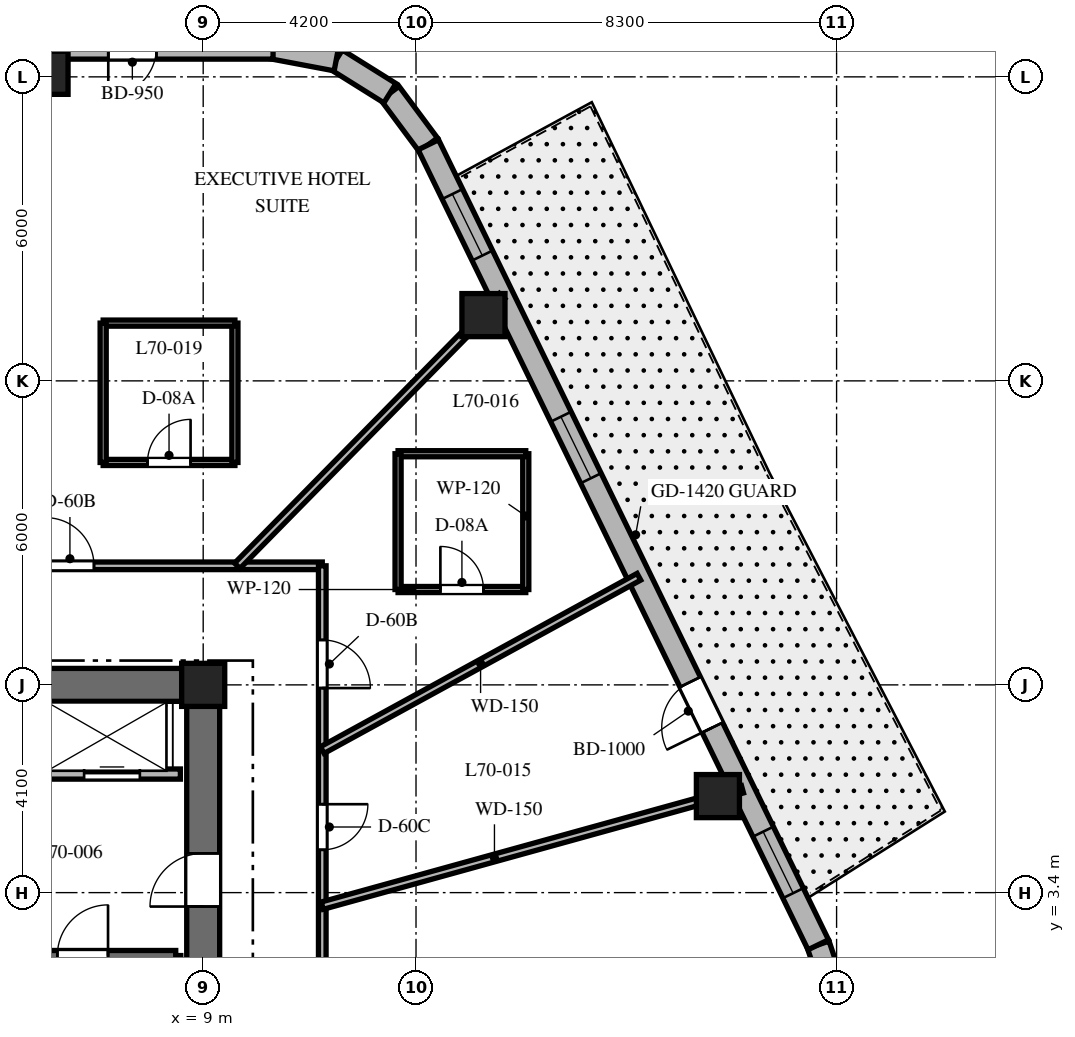
"""IFC4 building model, lengths in metres.
Left out: names, types, materials, properties, quantities, classifications, styles, units other than length and angle.
Written with IfcOpenShell. Run it as: python <this file> out.ifc"""

import sys

from ifc_helpers import new_model, si_unit, direction, frame, frame_2d, origin, origin_2d, place, context, subcontext, project, spatial, rectangle, extrude, element, fill, save


model = new_model("IFC4")
c1 = context("Model", 3, precision=1e-05, world=origin(), true_north=direction((0.0, 1.0)))
c2 = subcontext(c1, "Body", "Model", "MODEL_VIEW")
j1 = project(units=[si_unit("LENGTHUNIT", "METRE"), si_unit("PLANEANGLEUNIT", "RADIAN")], contexts=[c1])
p1 = place(None, origin())
s1 = spatial("IfcSite", under=j1, at=p1, CompositionType="ELEMENT")
p2 = place(p1, origin())
s2 = spatial("IfcBuilding", under=s1, at=p2, CompositionType="ELEMENT")
p3 = place(p2, frame((0.0, 0.0, 280.8)))
s3 = spatial("IfcBuildingStorey", under=s2, at=p3, CompositionType="ELEMENT", Elevation=280.8)
p4 = place(p3, frame((1.85, 7.5, 0.0), z_axis=(0.0, 0.0, 1.0), x_axis=(1.0, 0.0, 0.0)))
e1 = element("IfcWall", 1, at=p4, inside=s3, PredefinedType="SHEAR", context=c2, shape_type="SweptSolid", body=[
    extrude(rectangle(XDim=7.475, YDim=0.65, at=frame_2d((3.737, 0.0))), origin(), (0.0, 0.0, 1.0), 3.9),
])
p5 = place(p3, frame((9.0, -7.175, 0.0), z_axis=(0.0, 0.0, 1.0), x_axis=(0.0, 1.0, 0.0)))
e2 = element("IfcWall", 2, at=p5, inside=s3, PredefinedType="SHEAR", context=c2, shape_type="SweptSolid", body=[
    extrude(rectangle(XDim=14.35, YDim=0.65, at=frame_2d((7.175, 0.0))), origin(), (0.0, 0.0, 1.0), 3.9),
])
p6 = place(p5, frame((10.3, 0.0, 0.0)))
e3 = element("IfcOpeningElement", 3, at=p6, cuts=e2, PredefinedType="OPENING", context=c2, shape_type="SweptSolid", body=[
    extrude(rectangle(XDim=1.05, YDim=2.15, at=frame_2d((0.525, 1.075))), frame((0.0, 0.335, 0.0), z_axis=(0.0, -1.0, 0.0), x_axis=(1.0, 0.0, 0.0)), (0.0, 0.0, 1.0), 0.67),
])
p7 = place(p3, frame((8.458, -6.985, 0.0), z_axis=(0.0, 0.0, 1.0), x_axis=(0.0, 1.0, 0.0)))
e4 = element("IfcWall", 4, at=p7, inside=s3, PredefinedType="SHEAR", context=c2, shape_type="SweptSolid", body=[
    extrude(rectangle(XDim=9.143, YDim=0.2, at=frame_2d((4.572, 0.0))), origin(), (0.0, 0.0, 1.0), 3.9),
])
p8 = place(p3, frame((4.772, 2.158, 0.0), z_axis=(0.0, 0.0, 1.0), x_axis=(1.0, 0.0, 0.0)))
e5 = element("IfcWall", 5, at=p8, inside=s3, PredefinedType="SHEAR", context=c2, shape_type="SweptSolid", body=[
    extrude(rectangle(XDim=3.686, YDim=0.2, at=frame_2d((1.843, 0.0))), origin(), (0.0, 0.0, 1.0), 3.9),
])
p9 = place(p8, frame((1.35, 0.0, 0.0)))
e6 = element("IfcOpeningElement", 6, at=p9, cuts=e5, PredefinedType="OPENING", context=c2, shape_type="SweptSolid", body=[
    extrude(rectangle(XDim=1.0, YDim=2.15, at=frame_2d((0.5, 1.075))), frame((0.0, 0.11, 0.0), z_axis=(0.0, -1.0, 0.0), x_axis=(1.0, 0.0, 0.0)), (0.0, 0.0, 1.0), 0.22),
])
for number, where, z_axis, x_axis in (
    (7, (9.0, 7.5, 0.0), (0.0, 0.0, 1.0), (1.0, 0.0, 0.0)),
    (8, (19.158, 5.305, 0.0), (0.0, 0.0, 1.0), (1.0, 0.0, 0.0)),
    (9, (14.531, 14.798, 0.0), (0.0, 0.0, 1.0), (1.0, 0.0, 0.0)),
    (10, (5.908, 19.58, 0.0), (0.0, 0.0, 1.0), (1.0, 0.0, 0.0)),
):
    element("IfcColumn", number, at=place(p3, frame(where, z_axis=z_axis, x_axis=x_axis)), inside=s3, PredefinedType="COLUMN", context=c2, shape_type="SweptSolid", body=[
        extrude(rectangle(XDim=0.85, YDim=0.85, at=origin_2d()), origin(), (0.0, 0.0, 1.0), 3.9),
    ])
p10 = place(p3, frame((21.422, 1.522, 0.0), z_axis=(0.0, 0.0, 1.0), x_axis=(-0.316964162323, 0.94843751497, 0.0)))
e11 = element("IfcWall", 11, at=p10, inside=s3, PredefinedType="SOLIDWALL", context=c2, shape_type="SweptSolid", body=[
    extrude(rectangle(XDim=0.895, YDim=0.45, at=frame_2d((0.448, 0.0))), origin(), (0.0, 0.0, 1.0), 3.6),
])
p11 = place(p3, frame((13.443, 18.16, 0.0), z_axis=(0.0, 0.0, 1.0), x_axis=(-0.597042425808, 0.802209661987, 0.0)))
e12 = element("IfcWall", 12, at=p11, inside=s3, PredefinedType="SOLIDWALL", context=c2, shape_type="SweptSolid", body=[
    extrude(rectangle(XDim=1.27, YDim=0.45, at=frame_2d((0.635, 0.0))), origin(), (0.0, 0.0, 1.0), 3.6),
])
p12 = place(p3, frame((12.685, 19.178, 0.0), z_axis=(0.0, 0.0, 1.0), x_axis=(-0.848031272749, 0.529946186362, 0.0)))
e13 = element("IfcWall", 13, at=p12, inside=s3, PredefinedType="SOLIDWALL", context=c2, shape_type="SweptSolid", body=[
    extrude(rectangle(XDim=1.248, YDim=0.45, at=frame_2d((0.624, 0.0))), origin(), (0.0, 0.0, 1.0), 3.6),
])
p13 = place(p3, frame((11.626, 19.84, 0.0), z_axis=(0.0, 0.0, 1.0), x_axis=(-0.982701956681, 0.185194126083, 0.0)))
e14 = element("IfcWall", 14, at=p13, inside=s3, PredefinedType="SOLIDWALL", context=c2, shape_type="SweptSolid", body=[
    extrude(rectangle(XDim=1.27, YDim=0.45, at=frame_2d((0.635, 0.0))), origin(), (0.0, 0.0, 1.0), 3.6),
])
p14 = place(p3, frame((21.138, 2.371, 0.0), z_axis=(0.0, 0.0, 1.0), x_axis=(-0.438128124058, 0.89891253574, 0.0)))
e15 = element("IfcWall", 15, at=p14, inside=s3, PredefinedType="SOLIDWALL", context=c2, shape_type="SweptSolid", body=[
    extrude(rectangle(XDim=17.565, YDim=0.45, at=frame_2d((8.782, 0.0))), origin(), (0.0, 0.0, 1.0), 3.6),
])
p15 = place(p14, frame((4.769, 0.0, 0.0)))
e16 = element("IfcOpeningElement", 16, at=p15, cuts=e15, PredefinedType="OPENING", context=c2, shape_type="SweptSolid", body=[
    extrude(rectangle(XDim=1.0, YDim=2.15, at=frame_2d((0.5, 1.075))), frame((0.0, 0.235, 0.0), z_axis=(0.0, -1.0, 0.0), x_axis=(1.0, 0.0, 0.0)), (0.0, 0.0, 1.0), 0.47),
])
p16 = place(p14, frame((10.243, 0.0, 0.8)))
e17 = element("IfcOpeningElement", 17, at=p16, cuts=e15, PredefinedType="OPENING", context=c2, shape_type="SweptSolid", body=[
    extrude(rectangle(XDim=1.35, YDim=1.75, at=frame_2d((0.675, 0.875))), frame((0.0, 0.235, 0.0), z_axis=(0.0, -1.0, 0.0), x_axis=(1.0, 0.0, 0.0)), (0.0, 0.0, 1.0), 0.47),
])
p17 = place(p14, frame((15.132, 0.0, 0.8)))
e18 = element("IfcOpeningElement", 18, at=p17, cuts=e15, PredefinedType="OPENING", context=c2, shape_type="SweptSolid", body=[
    extrude(rectangle(XDim=1.35, YDim=1.75, at=frame_2d((0.675, 0.875))), frame((0.0, 0.235, 0.0), z_axis=(0.0, -1.0, 0.0), x_axis=(1.0, 0.0, 0.0)), (0.0, 0.0, 1.0), 0.47),
])
p18 = place(p14, frame((1.133, 0.0, 0.8)))
e19 = element("IfcOpeningElement", 19, at=p18, cuts=e15, PredefinedType="OPENING", context=c2, shape_type="SweptSolid", body=[
    extrude(rectangle(XDim=1.35, YDim=1.75, at=frame_2d((0.675, 0.875))), frame((0.0, 0.235, 0.0), z_axis=(0.0, -1.0, 0.0), x_axis=(1.0, 0.0, 0.0)), (0.0, 0.0, 1.0), 0.47),
])
p19 = place(p3, frame((10.379, 20.075, 0.0), z_axis=(0.0, 0.0, 1.0), x_axis=(-1.0, 0.0, 0.0)))
e20 = element("IfcWall", 20, at=p19, inside=s3, PredefinedType="SOLIDWALL", context=c2, shape_type="SweptSolid", body=[
    extrude(rectangle(XDim=22.417, YDim=0.45, at=frame_2d((11.208, 0.0))), origin(), (0.0, 0.0, 1.0), 3.6),
])
p20 = place(p19, frame((2.302, 0.0, 0.0)))
e21 = element("IfcOpeningElement", 21, at=p20, cuts=e20, PredefinedType="OPENING", context=c2, shape_type="SweptSolid", body=[
    extrude(rectangle(XDim=0.95, YDim=2.15, at=frame_2d((0.475, 1.075))), frame((0.0, 0.235, 0.0), z_axis=(0.0, -1.0, 0.0), x_axis=(1.0, 0.0, 0.0)), (0.0, 0.0, 1.0), 0.47),
])
p21 = place(p19, frame((7.82, 0.0, 0.8)))
e22 = element("IfcOpeningElement", 22, at=p21, cuts=e20, PredefinedType="OPENING", context=c2, shape_type="SweptSolid", body=[
    extrude(rectangle(XDim=1.35, YDim=1.75, at=frame_2d((0.675, 0.875))), frame((0.0, 0.235, 0.0), z_axis=(0.0, -1.0, 0.0), x_axis=(1.0, 0.0, 0.0)), (0.0, 0.0, 1.0), 0.47),
])
p22 = place(p19, frame((13.978, 0.0, 0.8)))
e23 = element("IfcOpeningElement", 23, at=p22, cuts=e20, PredefinedType="OPENING", context=c2, shape_type="SweptSolid", body=[
    extrude(rectangle(XDim=1.35, YDim=1.75, at=frame_2d((0.675, 0.875))), frame((0.0, 0.235, 0.0), z_axis=(0.0, -1.0, 0.0), x_axis=(1.0, 0.0, 0.0)), (0.0, 0.0, 1.0), 0.47),
])
p23 = place(p19, frame((19.587, 0.0, 0.8)))
e24 = element("IfcOpeningElement", 24, at=p23, cuts=e20, PredefinedType="OPENING", context=c2, shape_type="SweptSolid", body=[
    extrude(rectangle(XDim=1.35, YDim=1.75, at=frame_2d((0.675, 0.875))), frame((0.0, 0.235, 0.0), z_axis=(0.0, -1.0, 0.0), x_axis=(1.0, 0.0, 0.0)), (0.0, 0.0, 1.0), 0.47),
])
p24 = place(p3, frame((4.5, 5.74, 0.0), z_axis=(0.0, 0.0, 1.0), x_axis=(1.0, 0.0, 0.0)))
e25 = element("IfcWall", 25, at=p24, inside=s3, PredefinedType="PARTITIONING", context=c2, shape_type="SweptSolid", body=[
    extrude(rectangle(XDim=4.05, YDim=0.2, at=frame_2d((2.025, 0.0))), origin(), (0.0, 0.0, 1.0), 3.6),
])
p25 = place(p24, frame((0.3, 0.0, 0.0)))
e26 = element("IfcOpeningElement", 26, at=p25, cuts=e25, PredefinedType="OPENING", context=c2, shape_type="SweptSolid", body=[
    extrude(rectangle(XDim=0.85, YDim=2.03, at=frame_2d((0.425, 1.015))), frame((0.0, 0.11, 0.0), z_axis=(0.0, -1.0, 0.0), x_axis=(1.0, 0.0, 0.0)), (0.0, 0.0, 1.0), 0.22),
])
p26 = place(p24, frame((2.15, 0.0, 0.0)))
e27 = element("IfcOpeningElement", 27, at=p26, cuts=e25, PredefinedType="OPENING", context=c2, shape_type="SweptSolid", body=[
    extrude(rectangle(XDim=1.1, YDim=2.2, at=frame_2d((0.55, 1.1))), frame((0.0, 0.11, 0.0), z_axis=(0.0, -1.0, 0.0), x_axis=(1.0, 0.0, 0.0)), (0.0, 0.0, 1.0), 0.22),
])
p27 = place(p3, frame((0.92, 9.85, 0.0), z_axis=(0.0, 0.0, 1.0), x_axis=(1.0, 0.0, 0.0)))
e28 = element("IfcWall", 28, at=p27, inside=s3, PredefinedType="PARTITIONING", context=c2, shape_type="SweptSolid", body=[
    extrude(rectangle(XDim=10.43, YDim=0.15, at=frame_2d((5.215, 0.0))), origin(), (0.0, 0.0, 1.0), 3.09),
])
p28 = place(p27, frame((4.975, 0.0, 0.0)))
e29 = element("IfcOpeningElement", 29, at=p28, cuts=e28, PredefinedType="OPENING", context=c2, shape_type="SweptSolid", body=[
    extrude(rectangle(XDim=0.95, YDim=2.03, at=frame_2d((0.475, 1.015))), frame((0.0, 0.085, 0.0), z_axis=(0.0, -1.0, 0.0), x_axis=(1.0, 0.0, 0.0)), (0.0, 0.0, 1.0), 0.17),
])
p29 = place(p3, frame((11.35, 9.85, 0.0), z_axis=(0.0, 0.0, 1.0), x_axis=(0.0, -1.0, 0.0)))
e30 = element("IfcWall", 30, at=p29, inside=s3, PredefinedType="PARTITIONING", context=c2, shape_type="SweptSolid", body=[
    extrude(rectangle(XDim=12.4, YDim=0.15, at=frame_2d((6.2, 0.0))), origin(), (0.0, 0.0, 1.0), 3.09),
])
p30 = place(p29, frame((4.705, 0.0, 0.0)))
e31 = element("IfcOpeningElement", 31, at=p30, cuts=e30, PredefinedType="OPENING", context=c2, shape_type="SweptSolid", body=[
    extrude(rectangle(XDim=0.9, YDim=2.03, at=frame_2d((0.45, 1.015))), frame((0.0, 0.085, 0.0), z_axis=(0.0, -1.0, 0.0), x_axis=(1.0, 0.0, 0.0)), (0.0, 0.0, 1.0), 0.17),
])
p31 = place(p29, frame((1.463, 0.0, 0.0)))
e32 = element("IfcOpeningElement", 32, at=p31, cuts=e30, PredefinedType="OPENING", context=c2, shape_type="SweptSolid", body=[
    extrude(rectangle(XDim=0.95, YDim=2.03, at=frame_2d((0.475, 1.015))), frame((0.0, 0.085, 0.0), z_axis=(0.0, -1.0, 0.0), x_axis=(1.0, 0.0, 0.0)), (0.0, 0.0, 1.0), 0.17),
])
p32 = place(p29, frame((8.835, 0.0, 0.0)))
e33 = element("IfcOpeningElement", 33, at=p32, cuts=e30, PredefinedType="OPENING", context=c2, shape_type="SweptSolid", body=[
    extrude(rectangle(XDim=0.95, YDim=2.03, at=frame_2d((0.475, 1.015))), frame((0.0, 0.085, 0.0), z_axis=(0.0, -1.0, 0.0), x_axis=(1.0, 0.0, 0.0)), (0.0, 0.0, 1.0), 0.17),
])
p33 = place(p3, frame((11.35, 3.143, 0.0), z_axis=(0.0, 0.0, 1.0), x_axis=(0.963731818141, 0.266872596386, 0.0)))
e34 = element("IfcWall", 34, at=p33, inside=s3, PredefinedType="PARTITIONING", context=c2, shape_type="SweptSolid", body=[
    extrude(rectangle(XDim=8.605, YDim=0.15, at=frame_2d((4.302, 0.0))), origin(), (0.0, 0.0, 1.0), 2.94),
])
p34 = place(p3, frame((11.35, 6.213, 0.0), z_axis=(0.0, 0.0, 1.0), x_axis=(0.877157109774, 0.480203503499, 0.0)))
e35 = element("IfcWall", 35, at=p34, inside=s3, PredefinedType="PARTITIONING", context=c2, shape_type="SweptSolid", body=[
    extrude(rectangle(XDim=7.123, YDim=0.15, at=frame_2d((3.562, 0.0))), origin(), (0.0, 0.0, 1.0), 2.94),
])
p35 = place(p3, frame((9.672, 9.85, 0.0), z_axis=(0.0, 0.0, 1.0), x_axis=(0.700629771301, 0.713524998558, 0.0)))
e36 = element("IfcWall", 36, at=p35, inside=s3, PredefinedType="PARTITIONING", context=c2, shape_type="SweptSolid", body=[
    extrude(rectangle(XDim=7.459, YDim=0.15, at=frame_2d((3.73, 0.0))), origin(), (0.0, 0.0, 1.0), 2.94),
])
p36 = place(p3, frame((2.972, 9.85, 0.0), z_axis=(0.0, 0.0, 1.0), x_axis=(0.288872169679, 0.957367677324, 0.0)))
e37 = element("IfcWall", 37, at=p36, inside=s3, PredefinedType="PARTITIONING", context=c2, shape_type="SweptSolid", body=[
    extrude(rectangle(XDim=10.68, YDim=0.15, at=frame_2d((5.34, 0.0))), origin(), (0.0, 0.0, 1.0), 2.94),
])
p37 = place(p3, frame((12.846, 9.382, 0.0), z_axis=(0.0, 0.0, 1.0), x_axis=(1.0, 0.0, 0.0)))
e38 = element("IfcWall", 38, at=p37, inside=s3, PredefinedType="PARTITIONING", context=c2, shape_type="SweptSolid", body=[
    extrude(rectangle(XDim=2.52, YDim=0.12, at=frame_2d((1.26, 0.0))), origin(), (0.0, 0.0, 1.0), 3.126),
])
p38 = place(p37, frame((0.835, 0.0, 0.0)))
e39 = element("IfcOpeningElement", 39, at=p38, cuts=e38, PredefinedType="OPENING", context=c2, shape_type="SweptSolid", body=[
    extrude(rectangle(XDim=0.85, YDim=2.03, at=frame_2d((0.425, 1.015))), frame((0.0, 0.07, 0.0), z_axis=(0.0, -1.0, 0.0), x_axis=(1.0, 0.0, 0.0)), (0.0, 0.0, 1.0), 0.14),
])
p39 = place(p3, frame((15.366, 9.382, 0.0), z_axis=(0.0, 0.0, 1.0), x_axis=(0.0, 1.0, 0.0)))
e40 = element("IfcWall", 40, at=p39, inside=s3, PredefinedType="PARTITIONING", context=c2, shape_type="SweptSolid", body=[
    extrude(rectangle(XDim=2.68, YDim=0.12, at=frame_2d((1.34, 0.0))), origin(), (0.0, 0.0, 1.0), 3.6),
])
p40 = place(p3, frame((15.366, 12.062, 0.0), z_axis=(0.0, 0.0, 1.0), x_axis=(-1.0, 0.0, 0.0)))
e41 = element("IfcWall", 41, at=p40, inside=s3, PredefinedType="PARTITIONING", context=c2, shape_type="SweptSolid", body=[
    extrude(rectangle(XDim=2.52, YDim=0.12, at=frame_2d((1.26, 0.0))), origin(), (0.0, 0.0, 1.0), 3.126),
])
p41 = place(p3, frame((12.846, 12.062, 0.0), z_axis=(0.0, 0.0, 1.0), x_axis=(0.0, -1.0, 0.0)))
e42 = element("IfcWall", 42, at=p41, inside=s3, PredefinedType="PARTITIONING", context=c2, shape_type="SweptSolid", body=[
    extrude(rectangle(XDim=2.68, YDim=0.12, at=frame_2d((1.34, 0.0))), origin(), (0.0, 0.0, 1.0), 3.126),
])
p42 = place(p3, frame((7.026, 11.89, 0.0), z_axis=(0.0, 0.0, 1.0), x_axis=(1.0, 0.0, 0.0)))
e43 = element("IfcWall", 43, at=p42, inside=s3, PredefinedType="PARTITIONING", context=c2, shape_type="SweptSolid", body=[
    extrude(rectangle(XDim=2.6, YDim=0.12, at=frame_2d((1.3, 0.0))), origin(), (0.0, 0.0, 1.0), 3.041),
])
p43 = place(p42, frame((0.875, 0.0, 0.0)))
e44 = element("IfcOpeningElement", 44, at=p43, cuts=e43, PredefinedType="OPENING", context=c2, shape_type="SweptSolid", body=[
    extrude(rectangle(XDim=0.85, YDim=2.03, at=frame_2d((0.425, 1.015))), frame((0.0, 0.07, 0.0), z_axis=(0.0, -1.0, 0.0), x_axis=(1.0, 0.0, 0.0)), (0.0, 0.0, 1.0), 0.14),
])
p44 = place(p3, frame((9.626, 11.89, 0.0), z_axis=(0.0, 0.0, 1.0), x_axis=(0.0, 1.0, 0.0)))
e45 = element("IfcWall", 45, at=p44, inside=s3, PredefinedType="PARTITIONING", context=c2, shape_type="SweptSolid", body=[
    extrude(rectangle(XDim=2.75, YDim=0.12, at=frame_2d((1.375, 0.0))), origin(), (0.0, 0.0, 1.0), 3.172),
])
p45 = place(p3, frame((9.626, 14.64, 0.0), z_axis=(0.0, 0.0, 1.0), x_axis=(-1.0, 0.0, 0.0)))
e46 = element("IfcWall", 46, at=p45, inside=s3, PredefinedType="PARTITIONING", context=c2, shape_type="SweptSolid", body=[
    extrude(rectangle(XDim=2.6, YDim=0.12, at=frame_2d((1.3, 0.0))), origin(), (0.0, 0.0, 1.0), 3.172),
])
p46 = place(p3, frame((7.026, 14.64, 0.0), z_axis=(0.0, 0.0, 1.0), x_axis=(0.0, -1.0, 0.0)))
e47 = element("IfcWall", 47, at=p46, inside=s3, PredefinedType="PARTITIONING", context=c2, shape_type="SweptSolid", body=[
    extrude(rectangle(XDim=2.75, YDim=0.12, at=frame_2d((1.375, 0.0))), origin(), (0.0, 0.0, 1.0), 3.041),
])
p47 = place(p15, origin())
e48 = element("IfcDoor", 48, at=p47, inside=s3, OperationType="SINGLE_SWING_LEFT", PredefinedType="DOOR", context=c2, shape_type="SweptSolid", body=[
    extrude(rectangle(XDim=1.0, YDim=2.15, at=frame_2d((0.5, 1.075))), frame((0.0, 0.025, 0.0), z_axis=(0.0, -1.0, 0.0), x_axis=(1.0, 0.0, 0.0)), (0.0, 0.0, 1.0), 0.05),
])
fill(e16, e48)
p48 = place(p16, origin())
e49 = element("IfcWindow", 49, at=p48, inside=s3, PartitioningType="SINGLE_PANEL", PredefinedType="WINDOW", context=c2, shape_type="SweptSolid", body=[
    extrude(rectangle(XDim=1.35, YDim=1.75, at=frame_2d((0.675, 0.875))), frame((0.0, 0.03, 0.0), z_axis=(0.0, -1.0, 0.0), x_axis=(1.0, 0.0, 0.0)), (0.0, 0.0, 1.0), 0.06),
])
fill(e17, e49)
p49 = place(p17, origin())
e50 = element("IfcWindow", 50, at=p49, inside=s3, PartitioningType="SINGLE_PANEL", PredefinedType="WINDOW", context=c2, shape_type="SweptSolid", body=[
    extrude(rectangle(XDim=1.35, YDim=1.75, at=frame_2d((0.675, 0.875))), frame((0.0, 0.03, 0.0), z_axis=(0.0, -1.0, 0.0), x_axis=(1.0, 0.0, 0.0)), (0.0, 0.0, 1.0), 0.06),
])
fill(e18, e50)
p50 = place(p18, origin())
e51 = element("IfcWindow", 51, at=p50, inside=s3, PartitioningType="SINGLE_PANEL", PredefinedType="WINDOW", context=c2, shape_type="SweptSolid", body=[
    extrude(rectangle(XDim=1.35, YDim=1.75, at=frame_2d((0.675, 0.875))), frame((0.0, 0.03, 0.0), z_axis=(0.0, -1.0, 0.0), x_axis=(1.0, 0.0, 0.0)), (0.0, 0.0, 1.0), 0.06),
])
fill(e19, e51)
p51 = place(p9, origin())
e52 = element("IfcDoor", 52, at=p51, inside=s3, OperationType="SINGLE_SWING_RIGHT", PredefinedType="DOOR", context=c2, shape_type="SweptSolid", body=[
    extrude(rectangle(XDim=1.0, YDim=2.15, at=frame_2d((0.5, 1.075))), frame((0.0, 0.025, 0.0), z_axis=(0.0, -1.0, 0.0), x_axis=(1.0, 0.0, 0.0)), (0.0, 0.0, 1.0), 0.05),
])
fill(e6, e52)
p52 = place(p6, origin())
e53 = element("IfcDoor", 53, at=p52, inside=s3, OperationType="SINGLE_SWING_LEFT", PredefinedType="DOOR", context=c2, shape_type="SweptSolid", body=[
    extrude(rectangle(XDim=1.05, YDim=2.15, at=frame_2d((0.525, 1.075))), frame((0.0, 0.025, 0.0), z_axis=(0.0, -1.0, 0.0), x_axis=(1.0, 0.0, 0.0)), (0.0, 0.0, 1.0), 0.05),
])
fill(e3, e53)
p53 = place(p26, origin())
e54 = element("IfcDoor", 54, at=p53, inside=s3, OperationType="SLIDING_TO_RIGHT", PredefinedType="DOOR", context=c2, shape_type="SweptSolid", body=[
    extrude(rectangle(XDim=1.1, YDim=2.2, at=frame_2d((0.55, 1.1))), frame((0.0, 0.025, 0.0), z_axis=(0.0, -1.0, 0.0), x_axis=(1.0, 0.0, 0.0)), (0.0, 0.0, 1.0), 0.05),
])
fill(e27, e54)
p54 = place(p30, origin())
e55 = element("IfcDoor", 55, at=p54, inside=s3, OperationType="SINGLE_SWING_LEFT", PredefinedType="DOOR", context=c2, shape_type="SweptSolid", body=[
    extrude(rectangle(XDim=0.9, YDim=2.03, at=frame_2d((0.45, 1.015))), frame((0.0, 0.025, 0.0), z_axis=(0.0, -1.0, 0.0), x_axis=(1.0, 0.0, 0.0)), (0.0, 0.0, 1.0), 0.05),
])
fill(e31, e55)
p55 = place(p31, origin())
e56 = element("IfcDoor", 56, at=p55, inside=s3, OperationType="SINGLE_SWING_RIGHT", PredefinedType="DOOR", context=c2, shape_type="SweptSolid", body=[
    extrude(rectangle(XDim=0.95, YDim=2.03, at=frame_2d((0.475, 1.015))), frame((0.0, 0.025, 0.0), z_axis=(0.0, -1.0, 0.0), x_axis=(1.0, 0.0, 0.0)), (0.0, 0.0, 1.0), 0.05),
])
fill(e32, e56)
p56 = place(p38, origin())
e57 = element("IfcDoor", 57, at=p56, inside=s3, OperationType="SINGLE_SWING_LEFT", PredefinedType="DOOR", context=c2, shape_type="SweptSolid", body=[
    extrude(rectangle(XDim=0.85, YDim=2.03, at=frame_2d((0.425, 1.015))), frame((0.0, 0.025, 0.0), z_axis=(0.0, -1.0, 0.0), x_axis=(1.0, 0.0, 0.0)), (0.0, 0.0, 1.0), 0.05),
])
fill(e39, e57)
p57 = place(p28, origin())
e58 = element("IfcDoor", 58, at=p57, inside=s3, OperationType="SINGLE_SWING_LEFT", PredefinedType="DOOR", context=c2, shape_type="SweptSolid", body=[
    extrude(rectangle(XDim=0.95, YDim=2.03, at=frame_2d((0.475, 1.015))), frame((0.0, 0.025, 0.0), z_axis=(0.0, -1.0, 0.0), x_axis=(1.0, 0.0, 0.0)), (0.0, 0.0, 1.0), 0.05),
])
fill(e29, e58)
p58 = place(p43, origin())
e59 = element("IfcDoor", 59, at=p58, inside=s3, OperationType="SINGLE_SWING_RIGHT", PredefinedType="DOOR", context=c2, shape_type="SweptSolid", body=[
    extrude(rectangle(XDim=0.85, YDim=2.03, at=frame_2d((0.425, 1.015))), frame((0.0, 0.025, 0.0), z_axis=(0.0, -1.0, 0.0), x_axis=(1.0, 0.0, 0.0)), (0.0, 0.0, 1.0), 0.05),
])
fill(e44, e59)
save(model, sys.argv[1])
